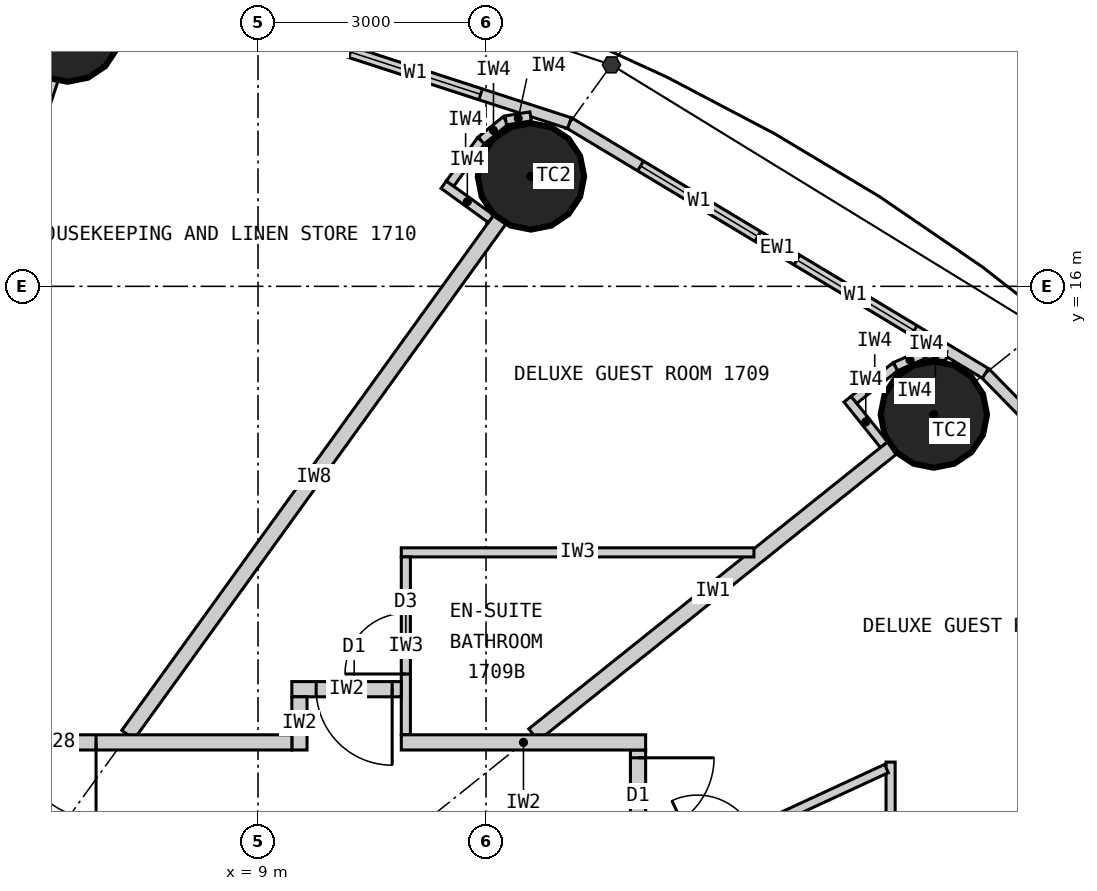
"""IFC4 building model, lengths in metres.
Left out: names, types, materials, properties, quantities, classifications, styles, units other than length and angle.
Written with IfcOpenShell. Run it as: python <this file> out.ifc"""

import sys

from ifc_helpers import new_model, si_unit, direction, frame, frame_2d, origin, origin_2d, place, context, subcontext, project, spatial, rectangle, circle, extrude, element, fill, save


model = new_model("IFC4")
c1 = context("Model", 3, precision=1e-05, world=origin(), true_north=direction((0.0, 1.0)))
c2 = subcontext(c1, "Body", "Model", "MODEL_VIEW")
j1 = project(units=[si_unit("LENGTHUNIT", "METRE"), si_unit("PLANEANGLEUNIT", "RADIAN")], contexts=[c1])
p1 = place(None, origin())
s1 = spatial("IfcSite", under=j1, at=p1, CompositionType="ELEMENT")
p2 = place(p1, origin())
s2 = spatial("IfcBuilding", under=s1, at=p2, CompositionType="ELEMENT")
p3 = place(p2, frame((0.0, 0.0, 70.5)))
s3 = spatial("IfcBuildingStorey", under=s2, at=p3, CompositionType="ELEMENT", Elevation=70.5)
for number, where, z_axis, x_axis in (
    (1, (17.892, 14.313, 0.0), (0.0, 0.0, 1.0), (1.0, 0.0, 0.0)),
    (2, (12.591, 17.447, 0.0), (0.0, 0.0, 1.0), (1.0, 0.0, 0.0)),
    (3, (6.495, 19.391, 0.0), (0.0, 0.0, 1.0), (1.0, 0.0, 0.0)),
):
    element("IfcColumn", number, at=place(p3, frame(where, z_axis=z_axis, x_axis=x_axis)), inside=s3, PredefinedType="COLUMN", context=c2, shape_type="SweptSolid", body=[
        extrude(circle(Radius=0.7, at=origin_2d()), origin(), (0.0, 0.0, 1.0), 3.3),
    ])
p4 = place(p3, frame((22.803, 10.532, 0.0), z_axis=(0.0, 0.0, 1.0), x_axis=(-0.699602905915, 0.714531856557, 0.0)))
e4 = element("IfcWall", 4, at=p4, inside=s3, PredefinedType="ELEMENTEDWALL", context=c2, shape_type="SweptSolid", body=[
    extrude(rectangle(XDim=6.051, YDim=0.15, at=frame_2d((3.025, 0.0))), origin(), (0.0, 0.0, 1.0), 3.12),
])
p5 = place(p4, frame((0.926, 0.0, 0.9)))
e5 = element("IfcOpeningElement", 5, at=p5, cuts=e4, PredefinedType="OPENING", context=c2, shape_type="SweptSolid", body=[
    extrude(rectangle(XDim=1.8, YDim=1.9, at=frame_2d((0.9, 0.95))), frame((0.0, 0.085, 0.0), z_axis=(0.0, -1.0, 0.0), x_axis=(1.0, 0.0, 0.0)), (0.0, 0.0, 1.0), 0.17),
])
p6 = place(p4, frame((3.325, 0.0, 0.9)))
e6 = element("IfcOpeningElement", 6, at=p6, cuts=e4, PredefinedType="OPENING", context=c2, shape_type="SweptSolid", body=[
    extrude(rectangle(XDim=1.8, YDim=1.9, at=frame_2d((0.9, 0.95))), frame((0.0, 0.085, 0.0), z_axis=(0.0, -1.0, 0.0), x_axis=(1.0, 0.0, 0.0)), (0.0, 0.0, 1.0), 0.17),
])
p7 = place(p3, frame((18.57, 14.856, 0.0), z_axis=(0.0, 0.0, 1.0), x_axis=(-0.856983180864, 0.515344377787, 0.0)))
e7 = element("IfcWall", 7, at=p7, inside=s3, PredefinedType="ELEMENTEDWALL", context=c2, shape_type="SweptSolid", body=[
    extrude(rectangle(XDim=6.386, YDim=0.15, at=frame_2d((3.193, 0.0))), origin(), (0.0, 0.0, 1.0), 3.12),
])
p8 = place(p7, frame((1.093, 0.0, 0.9)))
e8 = element("IfcOpeningElement", 8, at=p8, cuts=e7, PredefinedType="OPENING", context=c2, shape_type="SweptSolid", body=[
    extrude(rectangle(XDim=1.8, YDim=1.9, at=frame_2d((0.9, 0.95))), frame((0.0, 0.085, 0.0), z_axis=(0.0, -1.0, 0.0), x_axis=(1.0, 0.0, 0.0)), (0.0, 0.0, 1.0), 0.17),
])
p9 = place(p7, frame((3.493, 0.0, 0.9)))
e9 = element("IfcOpeningElement", 9, at=p9, cuts=e7, PredefinedType="OPENING", context=c2, shape_type="SweptSolid", body=[
    extrude(rectangle(XDim=1.8, YDim=1.9, at=frame_2d((0.9, 0.95))), frame((0.0, 0.085, 0.0), z_axis=(0.0, -1.0, 0.0), x_axis=(1.0, 0.0, 0.0)), (0.0, 0.0, 1.0), 0.17),
])
p10 = place(p3, frame((13.096, 18.147, 0.0), z_axis=(0.0, 0.0, 1.0), x_axis=(-0.951137534625, 0.308767534285, 0.0)))
e10 = element("IfcWall", 10, at=p10, inside=s3, PredefinedType="ELEMENTEDWALL", context=c2, shape_type="SweptSolid", body=[
    extrude(rectangle(XDim=6.655, YDim=0.15, at=frame_2d((3.328, 0.0))), origin(), (0.0, 0.0, 1.0), 3.12),
])
p11 = place(p10, frame((1.228, 0.0, 0.9)))
e11 = element("IfcOpeningElement", 11, at=p11, cuts=e10, PredefinedType="OPENING", context=c2, shape_type="SweptSolid", body=[
    extrude(rectangle(XDim=1.8, YDim=1.9, at=frame_2d((0.9, 0.95))), frame((0.0, 0.085, 0.0), z_axis=(0.0, -1.0, 0.0), x_axis=(1.0, 0.0, 0.0)), (0.0, 0.0, 1.0), 0.17),
])
p12 = place(p10, frame((3.628, 0.0, 0.9)))
e12 = element("IfcOpeningElement", 12, at=p12, cuts=e10, PredefinedType="OPENING", context=c2, shape_type="SweptSolid", body=[
    extrude(rectangle(XDim=1.8, YDim=1.9, at=frame_2d((0.9, 0.95))), frame((0.0, 0.085, 0.0), z_axis=(0.0, -1.0, 0.0), x_axis=(1.0, 0.0, 0.0)), (0.0, 0.0, 1.0), 0.17),
])
p13 = place(p3, frame((14.1, 6.512, 0.0), z_axis=(0.0, 0.0, 1.0), x_axis=(0.907832871056, 0.419332181247, 0.0)))
e13 = element("IfcWall", 13, at=p13, inside=s3, PredefinedType="PARTITIONING", context=c2, shape_type="SweptSolid", body=[
    extrude(rectangle(XDim=8.023, YDim=0.2, at=frame_2d((4.011, 0.0))), origin(), (0.0, 0.0, 1.0), 2.32),
])
p14 = place(p3, frame((12.625, 10.1, 0.0), z_axis=(0.0, 0.0, 1.0), x_axis=(0.780892451574, 0.624665493744, 0.0)))
e14 = element("IfcWall", 14, at=p14, inside=s3, PredefinedType="PARTITIONING", context=c2, shape_type="SweptSolid", body=[
    extrude(rectangle(XDim=6.045, YDim=0.2, at=frame_2d((3.022, 0.0))), origin(), (0.0, 0.0, 1.0), 2.32),
])
p15 = place(p3, frame((7.289, 10.1, 0.0), z_axis=(0.0, 0.0, 1.0), x_axis=(0.585198353053, 0.810890182197, 0.0)))
e15 = element("IfcWall", 15, at=p15, inside=s3, PredefinedType="PARTITIONING", context=c2, shape_type="SweptSolid", body=[
    extrude(rectangle(XDim=8.36, YDim=0.2, at=frame_2d((4.18, 0.0))), origin(), (0.0, 0.0, 1.0), 2.32),
])
p16 = place(p3, frame((3.383, 10.1, 0.0), z_axis=(0.0, 0.0, 1.0), x_axis=(0.31759592231, 0.948226149256, 0.0)))
e16 = element("IfcWall", 16, at=p16, inside=s3, PredefinedType="PARTITIONING", context=c2, shape_type="SweptSolid", body=[
    extrude(rectangle(XDim=9.098, YDim=0.2, at=frame_2d((4.549, 0.0))), origin(), (0.0, 0.0, 1.0), 2.32),
])
p17 = place(p3, frame((17.323, 8.101, 0.0), z_axis=(0.0, 0.0, 1.0), x_axis=(0.0, 1.0, 0.0)))
e17 = element("IfcWall", 17, at=p17, inside=s3, PredefinedType="PARTITIONING", context=c2, shape_type="SweptSolid", body=[
    extrude(rectangle(XDim=1.64, YDim=0.12, at=frame_2d((0.82, 0.0))), origin(), (0.0, 0.0, 1.0), 3.12),
])
p18 = place(p3, frame((14.1, 8.193, 0.0), z_axis=(0.0, 0.0, 1.0), x_axis=(0.907836493557, 0.419324338628, 0.0)))
e18 = element("IfcWall", 18, at=p18, inside=s3, PredefinedType="PARTITIONING", context=c2, shape_type="SweptSolid", body=[
    extrude(rectangle(XDim=3.49, YDim=0.12, at=frame_2d((1.745, 0.0))), origin(), (0.0, 0.0, 1.0), 3.12),
])
p19 = place(p18, frame((0.75, 0.0, 0.0)))
e19 = element("IfcOpeningElement", 19, at=p19, cuts=e18, PredefinedType="OPENING", context=c2, shape_type="SweptSolid", body=[
    extrude(rectangle(XDim=0.8, YDim=2.1, at=frame_2d((0.4, 1.05))), frame((0.0, 0.07, 0.0), z_axis=(0.0, -1.0, 0.0), x_axis=(1.0, 0.0, 0.0)), (0.0, 0.0, 1.0), 0.14),
])
p20 = place(p3, frame((15.525, 12.5, 0.0), z_axis=(0.0, 0.0, 1.0), x_axis=(-1.0, 0.0, 0.0)))
e20 = element("IfcWall", 20, at=p20, inside=s3, PredefinedType="PARTITIONING", context=c2, shape_type="SweptSolid", body=[
    extrude(rectangle(XDim=4.64, YDim=0.12, at=frame_2d((2.32, 0.0))), origin(), (0.0, 0.0, 1.0), 3.12),
])
p21 = place(p3, frame((10.945, 10.1, 0.0), z_axis=(0.0, 0.0, 1.0), x_axis=(0.0, 1.0, 0.0)))
e21 = element("IfcWall", 21, at=p21, inside=s3, PredefinedType="PARTITIONING", context=c2, shape_type="SweptSolid", body=[
    extrude(rectangle(XDim=2.34, YDim=0.12, at=frame_2d((1.17, 0.0))), origin(), (0.0, 0.0, 1.0), 3.12),
])
p22 = place(p21, frame((0.8, 0.0, 0.0)))
e22 = element("IfcOpeningElement", 22, at=p22, cuts=e21, PredefinedType="OPENING", context=c2, shape_type="SweptSolid", body=[
    extrude(rectangle(XDim=0.8, YDim=2.1, at=frame_2d((0.4, 1.05))), frame((0.0, 0.07, 0.0), z_axis=(0.0, -1.0, 0.0), x_axis=(1.0, 0.0, 0.0)), (0.0, 0.0, 1.0), 0.14),
])
p23 = place(p3, frame((9.445, 10.7, 0.0), z_axis=(0.0, 0.0, 1.0), x_axis=(1.0, 0.0, 0.0)))
e23 = element("IfcWall", 23, at=p23, inside=s3, PredefinedType="PARTITIONING", context=c2, shape_type="SweptSolid", body=[
    extrude(rectangle(XDim=1.44, YDim=0.2, at=frame_2d((0.72, 0.0))), origin(), (0.0, 0.0, 1.0), 3.12),
])
p24 = place(p23, frame((0.32, 0.0, 0.0)))
e24 = element("IfcOpeningElement", 24, at=p24, cuts=e23, PredefinedType="OPENING", context=c2, shape_type="SweptSolid", body=[
    extrude(rectangle(XDim=1.0, YDim=2.2, at=frame_2d((0.5, 1.1))), frame((0.0, 0.11, 0.0), z_axis=(0.0, -1.0, 0.0), x_axis=(1.0, 0.0, 0.0)), (0.0, 0.0, 1.0), 0.22),
])
p25 = place(p3, frame((9.545, 9.9, 0.0), z_axis=(0.0, 0.0, 1.0), x_axis=(0.0, 1.0, 0.0)))
e25 = element("IfcWall", 25, at=p25, inside=s3, PredefinedType="PARTITIONING", context=c2, shape_type="SweptSolid", body=[
    extrude(rectangle(XDim=0.7, YDim=0.2, at=frame_2d((0.35, 0.0))), origin(), (0.0, 0.0, 1.0), 3.12),
])
p26 = place(p3, frame((14.0, 4.772, 0.0), z_axis=(0.0, 0.0, 1.0), x_axis=(0.0, 1.0, 0.0)))
e26 = element("IfcWall", 26, at=p26, inside=s3, PredefinedType="PARTITIONING", context=c2, shape_type="SweptSolid", body=[
    extrude(rectangle(XDim=5.127, YDim=0.2, at=frame_2d((2.564, 0.0))), origin(), (0.0, 0.0, 1.0), 3.12),
])
p27 = place(p26, frame((4.025, 0.0, 0.0)))
e27 = element("IfcOpeningElement", 27, at=p27, cuts=e26, PredefinedType="OPENING", context=c2, shape_type="SweptSolid", body=[
    extrude(rectangle(XDim=1.0, YDim=2.2, at=frame_2d((0.5, 1.1))), frame((0.0, 0.11, 0.0), z_axis=(0.0, -1.0, 0.0), x_axis=(1.0, 0.0, 0.0)), (0.0, 0.0, 1.0), 0.22),
])
p28 = place(p3, frame((-1.74, 10.0, 0.0), z_axis=(0.0, 0.0, 1.0), x_axis=(1.0, 0.0, 0.0)))
e28 = element("IfcWall", 28, at=p28, inside=s3, PredefinedType="PARTITIONING", context=c2, shape_type="SweptSolid", body=[
    extrude(rectangle(XDim=11.185, YDim=0.2, at=frame_2d((5.593, 0.0))), origin(), (0.0, 0.0, 1.0), 3.12),
])
p29 = place(p28, frame((7.609, 0.0, 0.0)))
e29 = element("IfcOpeningElement", 29, at=p29, cuts=e28, PredefinedType="OPENING", context=c2, shape_type="SweptSolid", body=[
    extrude(rectangle(XDim=1.0, YDim=2.2, at=frame_2d((0.5, 1.1))), frame((0.0, 0.11, 0.0), z_axis=(0.0, -1.0, 0.0), x_axis=(1.0, 0.0, 0.0)), (0.0, 0.0, 1.0), 0.22),
])
p30 = place(p28, frame((3.703, 0.0, 0.0)))
e30 = element("IfcOpeningElement", 30, at=p30, cuts=e28, PredefinedType="OPENING", context=c2, shape_type="SweptSolid", body=[
    extrude(rectangle(XDim=1.0, YDim=2.2, at=frame_2d((0.5, 1.1))), frame((0.0, 0.11, 0.0), z_axis=(0.0, -1.0, 0.0), x_axis=(1.0, 0.0, 0.0)), (0.0, 0.0, 1.0), 0.22),
])
p31 = place(p3, frame((10.885, 10.0, 0.0), z_axis=(0.0, 0.0, 1.0), x_axis=(1.0, 0.0, 0.0)))
e31 = element("IfcWall", 31, at=p31, inside=s3, PredefinedType="PARTITIONING", context=c2, shape_type="SweptSolid", body=[
    extrude(rectangle(XDim=3.215, YDim=0.2, at=frame_2d((1.607, 0.0))), origin(), (0.0, 0.0, 1.0), 3.12),
])
p32 = place(p3, frame((17.236, 13.917, 0.0), z_axis=(0.0, 0.0, 1.0), x_axis=(-0.624695047554, 0.780868809443, 0.0)))
e32 = element("IfcWall", 32, at=p32, inside=s3, PredefinedType="PARTITIONING", context=c2, shape_type="SweptSolid", body=[
    extrude(rectangle(XDim=0.768, YDim=0.12, at=frame_2d((0.384, 0.0))), origin(), (0.0, 0.0, 1.0), 3.12),
])
p33 = place(p3, frame((16.841, 14.507, 0.0), z_axis=(0.0, 0.0, 1.0), x_axis=(0.780902834923, 0.62465251333, 0.0)))
e33 = element("IfcWall", 33, at=p33, inside=s3, PredefinedType="PARTITIONING", context=c2, shape_type="SweptSolid", body=[
    extrude(rectangle(XDim=0.7, YDim=0.12, at=frame_2d((0.35, 0.0))), origin(), (0.0, 0.0, 1.0), 3.12),
])
p34 = place(p3, frame((17.387, 14.944, 0.0), z_axis=(0.0, 0.0, 1.0), x_axis=(0.916036698064, 0.401094462441, 0.0)))
e34 = element("IfcWall", 34, at=p34, inside=s3, PredefinedType="PARTITIONING", context=c2, shape_type="SweptSolid", body=[
    extrude(rectangle(XDim=0.418, YDim=0.12, at=frame_2d((0.209, 0.0))), origin(), (0.0, 0.0, 1.0), 3.12),
])
p35 = place(p3, frame((17.77, 15.112, 0.0), z_axis=(0.0, 0.0, 1.0), x_axis=(0.993904401174, -0.110245368731, 0.0)))
e35 = element("IfcWall", 35, at=p35, inside=s3, PredefinedType="PARTITIONING", context=c2, shape_type="SweptSolid", body=[
    extrude(rectangle(XDim=0.288, YDim=0.12, at=frame_2d((0.144, 0.0))), origin(), (0.0, 0.0, 1.0), 3.12),
])
p36 = place(p3, frame((12.065, 16.889, 0.0), z_axis=(0.0, 0.0, 1.0), x_axis=(-0.810821798253, 0.585293098778, 0.0)))
e36 = element("IfcWall", 36, at=p36, inside=s3, PredefinedType="PARTITIONING", context=c2, shape_type="SweptSolid", body=[
    extrude(rectangle(XDim=0.768, YDim=0.12, at=frame_2d((0.384, 0.0))), origin(), (0.0, 0.0, 1.0), 3.12),
])
p37 = place(p3, frame((11.526, 17.351, 0.0), z_axis=(0.0, 0.0, 1.0), x_axis=(0.585223113993, 0.810872312296, 0.0)))
e37 = element("IfcWall", 37, at=p37, inside=s3, PredefinedType="PARTITIONING", context=c2, shape_type="SweptSolid", body=[
    extrude(rectangle(XDim=0.7, YDim=0.12, at=frame_2d((0.35, 0.0))), origin(), (0.0, 0.0, 1.0), 3.12),
])
p38 = place(p3, frame((11.936, 17.919, 0.0), z_axis=(0.0, 0.0, 1.0), x_axis=(0.775023088441, 0.631932917629, 0.0)))
e38 = element("IfcWall", 38, at=p38, inside=s3, PredefinedType="PARTITIONING", context=c2, shape_type="SweptSolid", body=[
    extrude(rectangle(XDim=0.418, YDim=0.12, at=frame_2d((0.209, 0.0))), origin(), (0.0, 0.0, 1.0), 3.12),
])
p39 = place(p3, frame((12.26, 18.183, 0.0), z_axis=(0.0, 0.0, 1.0), x_axis=(0.987218661664, 0.159371622511, 0.0)))
e39 = element("IfcWall", 39, at=p39, inside=s3, PredefinedType="PARTITIONING", context=c2, shape_type="SweptSolid", body=[
    extrude(rectangle(XDim=0.331, YDim=0.12, at=frame_2d((0.166, 0.0))), origin(), (0.0, 0.0, 1.0), 3.12),
])
p40 = place(p8, origin())
e40 = element("IfcWindow", 40, at=p40, inside=s3, PartitioningType="SINGLE_PANEL", PredefinedType="WINDOW", context=c2, shape_type="SweptSolid", body=[
    extrude(rectangle(XDim=1.8, YDim=1.9, at=frame_2d((0.9, 0.95))), frame((0.0, 0.03, 0.0), z_axis=(0.0, -1.0, 0.0), x_axis=(1.0, 0.0, 0.0)), (0.0, 0.0, 1.0), 0.06),
])
fill(e8, e40)
p41 = place(p9, origin())
e41 = element("IfcWindow", 41, at=p41, inside=s3, PartitioningType="SINGLE_PANEL", PredefinedType="WINDOW", context=c2, shape_type="SweptSolid", body=[
    extrude(rectangle(XDim=1.8, YDim=1.9, at=frame_2d((0.9, 0.95))), frame((0.0, 0.03, 0.0), z_axis=(0.0, -1.0, 0.0), x_axis=(1.0, 0.0, 0.0)), (0.0, 0.0, 1.0), 0.06),
])
fill(e9, e41)
p42 = place(p11, origin())
e42 = element("IfcWindow", 42, at=p42, inside=s3, PartitioningType="SINGLE_PANEL", PredefinedType="WINDOW", context=c2, shape_type="SweptSolid", body=[
    extrude(rectangle(XDim=1.8, YDim=1.9, at=frame_2d((0.9, 0.95))), frame((0.0, 0.03, 0.0), z_axis=(0.0, -1.0, 0.0), x_axis=(1.0, 0.0, 0.0)), (0.0, 0.0, 1.0), 0.06),
])
fill(e11, e42)
p43 = place(p27, origin())
e43 = element("IfcDoor", 43, at=p43, inside=s3, OperationType="SINGLE_SWING_RIGHT", PredefinedType="DOOR", context=c2, shape_type="SweptSolid", body=[
    extrude(rectangle(XDim=1.0, YDim=2.2, at=frame_2d((0.5, 1.1))), frame((0.0, 0.025, 0.0), z_axis=(0.0, -1.0, 0.0), x_axis=(1.0, 0.0, 0.0)), (0.0, 0.0, 1.0), 0.05),
])
fill(e27, e43)
p44 = place(p22, origin())
e44 = element("IfcDoor", 44, at=p44, inside=s3, OperationType="SINGLE_SWING_LEFT", PredefinedType="DOOR", context=c2, shape_type="SweptSolid", body=[
    extrude(rectangle(XDim=0.8, YDim=2.1, at=frame_2d((0.4, 1.05))), frame((0.0, 0.025, 0.0), z_axis=(0.0, -1.0, 0.0), x_axis=(1.0, 0.0, 0.0)), (0.0, 0.0, 1.0), 0.05),
])
fill(e22, e44)
p45 = place(p24, origin())
e45 = element("IfcDoor", 45, at=p45, inside=s3, OperationType="SINGLE_SWING_RIGHT", PredefinedType="DOOR", context=c2, shape_type="SweptSolid", body=[
    extrude(rectangle(XDim=1.0, YDim=2.2, at=frame_2d((0.5, 1.1))), frame((0.0, 0.025, 0.0), z_axis=(0.0, -1.0, 0.0), x_axis=(1.0, 0.0, 0.0)), (0.0, 0.0, 1.0), 0.05),
])
fill(e24, e45)
p46 = place(p29, origin())
e46 = element("IfcDoor", 46, at=p46, inside=s3, OperationType="SINGLE_SWING_RIGHT", PredefinedType="DOOR", context=c2, shape_type="SweptSolid", body=[
    extrude(rectangle(XDim=1.0, YDim=2.2, at=frame_2d((0.5, 1.1))), frame((0.0, 0.025, 0.0), z_axis=(0.0, -1.0, 0.0), x_axis=(1.0, 0.0, 0.0)), (0.0, 0.0, 1.0), 0.05),
])
fill(e29, e46)
save(model, sys.argv[1])
